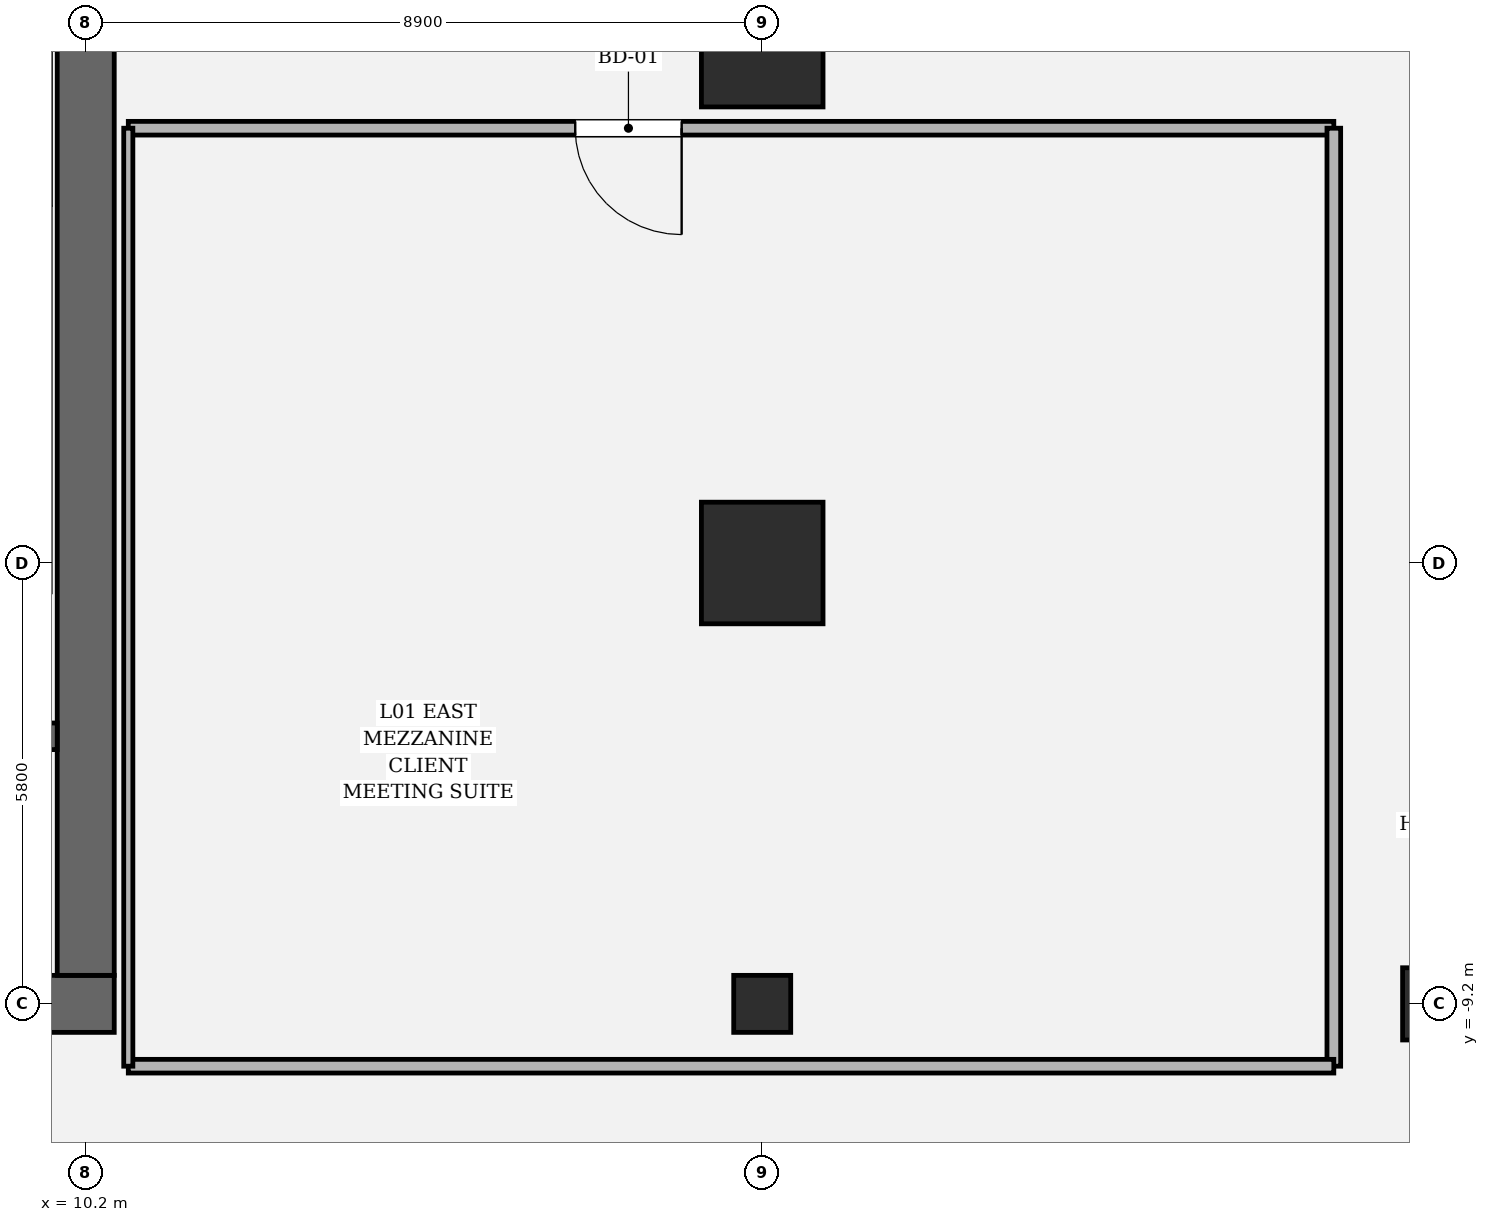
"""IFC4 building model, lengths in metres.
Left out: names, types, materials, properties, quantities, classifications, styles, units other than length and angle.
Written with IfcOpenShell. Run it as: python <this file> out.ifc"""

import sys

from ifc_helpers import new_model, si_unit, direction, frame, frame_2d, origin, origin_2d, place, context, subcontext, project, spatial, rectangle, hollow_rectangle, circle, extrude, element, fill, save


model = new_model("IFC4")
c1 = context("Model", 3, precision=1e-05, world=origin(), true_north=direction((0.0, 1.0)))
c2 = subcontext(c1, "Body", "Model", "MODEL_VIEW")
j1 = project(units=[si_unit("LENGTHUNIT", "METRE"), si_unit("PLANEANGLEUNIT", "RADIAN")], contexts=[c1])
p1 = place(None, origin())
s1 = spatial("IfcSite", under=j1, at=p1, CompositionType="ELEMENT")
p2 = place(p1, origin())
s2 = spatial("IfcBuilding", under=s1, at=p2, CompositionType="ELEMENT")
p3 = place(p2, frame((0.0, 0.0, 6.0)))
s3 = spatial("IfcBuildingStorey", under=s2, at=p3, CompositionType="ELEMENT", Elevation=6.0)
p4 = place(p3, frame((10.575, -9.2, 0.0), z_axis=(0.0, 0.0, 1.0), x_axis=(-1.0, 0.0, 0.0)))
e1 = element("IfcWall", 1, at=p4, inside=s3, PredefinedType="SHEAR", context=c2, shape_type="SweptSolid", body=[
    extrude(rectangle(XDim=21.15, YDim=0.75, at=frame_2d((10.575, 0.0))), origin(), (0.0, 0.0, 1.0), 5.4),
])
p5 = place(p4, frame((2.85, 0.0, 0.0)))
e2 = element("IfcOpeningElement", 2, at=p5, cuts=e1, PredefinedType="OPENING", context=c2, shape_type="SweptSolid", body=[
    extrude(rectangle(XDim=1.25, YDim=2.25, at=frame_2d((0.625, 1.125))), frame((0.0, 0.385, 0.0), z_axis=(0.0, -1.0, 0.0), x_axis=(1.0, 0.0, 0.0)), (0.0, 0.0, 1.0), 0.77),
])
p6 = place(p4, frame((17.05, 0.0, 0.0)))
e3 = element("IfcOpeningElement", 3, at=p6, cuts=e1, PredefinedType="OPENING", context=c2, shape_type="SweptSolid", body=[
    extrude(rectangle(XDim=1.25, YDim=2.25, at=frame_2d((0.625, 1.125))), frame((0.0, 0.385, 0.0), z_axis=(0.0, -1.0, 0.0), x_axis=(1.0, 0.0, 0.0)), (0.0, 0.0, 1.0), 0.77),
])
p7 = place(p3, frame((10.2, 8.825, 0.0), z_axis=(0.0, 0.0, 1.0), x_axis=(0.0, -1.0, 0.0)))
e4 = element("IfcWall", 4, at=p7, inside=s3, PredefinedType="SHEAR", context=c2, shape_type="SweptSolid", body=[
    extrude(rectangle(XDim=17.65, YDim=0.75, at=frame_2d((8.825, 0.0))), origin(), (0.0, 0.0, 1.0), 5.4),
])
p8 = place(p7, frame((3.855, 0.0, 0.0)))
e5 = element("IfcOpeningElement", 5, at=p8, cuts=e4, PredefinedType="OPENING", context=c2, shape_type="SweptSolid", body=[
    extrude(rectangle(XDim=1.18, YDim=2.2, at=frame_2d((0.59, 1.1))), frame((0.0, 0.385, 0.0), z_axis=(0.0, -1.0, 0.0), x_axis=(1.0, 0.0, 0.0)), (0.0, 0.0, 1.0), 0.77),
])
p9 = place(p3, frame((4.65, -5.68, 0.0), z_axis=(0.0, 0.0, 1.0), x_axis=(1.0, 0.0, 0.0)))
e6 = element("IfcWall", 6, at=p9, inside=s3, PredefinedType="SOLIDWALL", context=c2, shape_type="SweptSolid", body=[
    extrude(rectangle(XDim=5.175, YDim=0.35, at=frame_2d((2.587, 0.0))), origin(), (0.0, 0.0, 1.0), 5.4),
])
p10 = place(p9, frame((2.71, 0.0, 0.0)))
e7 = element("IfcOpeningElement", 7, at=p10, cuts=e6, PredefinedType="OPENING", context=c2, shape_type="SweptSolid", body=[
    extrude(rectangle(XDim=1.18, YDim=2.2, at=frame_2d((0.59, 1.1))), frame((0.0, 0.185, 0.0), z_axis=(0.0, -1.0, 0.0), x_axis=(1.0, 0.0, 0.0)), (0.0, 0.0, 1.0), 0.37),
])
for number, where, z_axis, x_axis in (
    (8, (19.1, -3.4, 0.0), (0.0, 0.0, 1.0), (1.0, 0.0, 0.0)),
    (9, (19.1, 3.4, 0.0), (0.0, 0.0, 1.0), (1.0, 0.0, 0.0)),
):
    element("IfcColumn", number, at=place(p3, frame(where, z_axis=z_axis, x_axis=x_axis)), inside=s3, PredefinedType="COLUMN", context=c2, shape_type="SweptSolid", body=[
        extrude(hollow_rectangle(XDim=1.6, YDim=1.6, WallThickness=0.05, at=origin_2d()), origin(), (0.0, 0.0, 1.0), 5.4),
    ])
p11 = place(p3, frame((28.0, -9.2, 0.0), z_axis=(0.0, 0.0, 1.0), x_axis=(1.0, 0.0, 0.0)))
e10 = element("IfcColumn", 10, at=p11, inside=s3, PredefinedType="COLUMN", context=c2, shape_type="SweptSolid", body=[
    extrude(rectangle(XDim=0.95, YDim=0.95, at=origin_2d()), origin(), (0.0, 0.0, 1.0), 5.4),
])
p12 = place(p3, frame((19.1, -9.2, 0.0), z_axis=(0.0, 0.0, 1.0), x_axis=(1.0, 0.0, 0.0)))
e11 = element("IfcColumn", 11, at=p12, inside=s3, PredefinedType="PILASTER", context=c2, shape_type="SweptSolid", body=[
    extrude(circle(Radius=0.375, at=origin_2d()), origin(), (0.0, 0.0, 1.0), 5.4),
])
p13 = place(p3, frame((10.76, 2.32, 0.0), z_axis=(0.0, 0.0, 1.0), x_axis=(1.0, 0.0, 0.0)))
e12 = element("IfcWall", 12, at=p13, inside=s3, PredefinedType="PARTITIONING", context=c2, shape_type="SweptSolid", body=[
    extrude(rectangle(XDim=15.86, YDim=0.18, at=frame_2d((7.93, 0.0))), origin(), (0.0, 0.0, 1.0), 4.414),
])
p14 = place(p13, frame((5.88, 0.0, 0.0)))
e13 = element("IfcOpeningElement", 13, at=p14, cuts=e12, PredefinedType="OPENING", context=c2, shape_type="SweptSolid", body=[
    extrude(rectangle(XDim=1.4, YDim=2.25, at=frame_2d((0.7, 1.125))), frame((0.0, 0.1, 0.0), z_axis=(0.0, -1.0, 0.0), x_axis=(1.0, 0.0, 0.0)), (0.0, 0.0, 1.0), 0.2),
])
p15 = place(p3, frame((26.62, 2.32, 0.0), z_axis=(0.0, 0.0, 1.0), x_axis=(0.0, -1.0, 0.0)))
e14 = element("IfcWall", 14, at=p15, inside=s3, PredefinedType="PARTITIONING", context=c2, shape_type="SweptSolid", body=[
    extrude(rectangle(XDim=12.34, YDim=0.18, at=frame_2d((6.17, 0.0))), origin(), (0.0, 0.0, 1.0), 4.414),
])
p16 = place(p3, frame((26.62, -10.02, 0.0), z_axis=(0.0, 0.0, 1.0), x_axis=(-1.0, 0.0, 0.0)))
e15 = element("IfcWall", 15, at=p16, inside=s3, PredefinedType="PARTITIONING", context=c2, shape_type="SweptSolid", body=[
    extrude(rectangle(XDim=15.86, YDim=0.18, at=frame_2d((7.93, 0.0))), origin(), (0.0, 0.0, 1.0), 4.414),
])
p17 = place(p3, frame((10.76, -10.02, 0.0), z_axis=(0.0, 0.0, 1.0), x_axis=(0.0, 1.0, 0.0)))
e16 = element("IfcWall", 16, at=p17, inside=s3, PredefinedType="PARTITIONING", context=c2, shape_type="SweptSolid", body=[
    extrude(rectangle(XDim=12.34, YDim=0.12, at=frame_2d((6.17, 0.0))), origin(), (0.0, 0.0, 1.0), 4.414),
])
p18 = place(p14, origin())
e17 = element("IfcDoor", 17, at=p18, inside=s3, OperationType="SINGLE_SWING_RIGHT", PredefinedType="DOOR", context=c2, shape_type="SweptSolid", body=[
    extrude(rectangle(XDim=1.4, YDim=2.25, at=frame_2d((0.7, 1.125))), frame((0.0, 0.025, 0.0), z_axis=(0.0, -1.0, 0.0), x_axis=(1.0, 0.0, 0.0)), (0.0, 0.0, 1.0), 0.05),
])
fill(e13, e17)
save(model, sys.argv[1])
